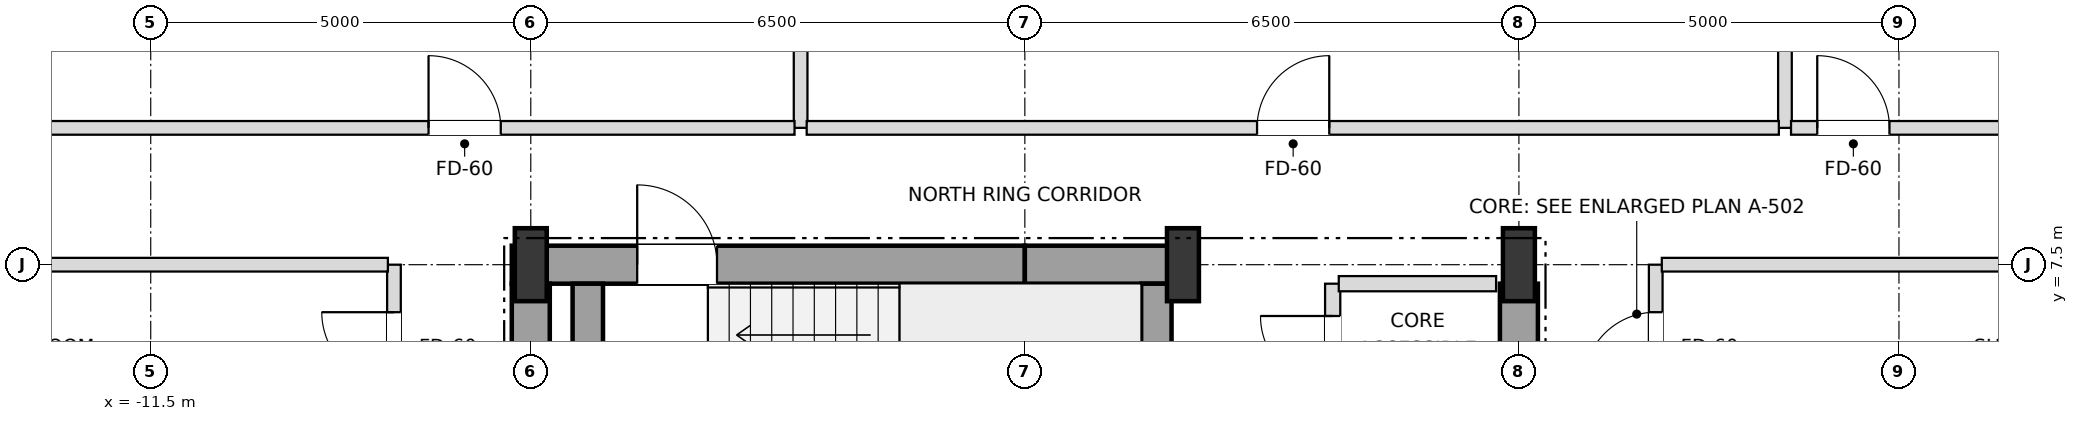
"""IFC4 building model, lengths in metres.
Left out: names, types, materials, properties, quantities, classifications, styles, units other than length and angle.
Written with IfcOpenShell. Run it as: python <this file> out.ifc"""

import sys

from ifc_helpers import new_model, si_unit, direction, frame, frame_2d, origin, origin_2d, place, context, subcontext, project, spatial, rectangle, i_section, extrude, element, fill, save


model = new_model("IFC4")
c1 = context("Model", 3, precision=1e-05, world=origin(), true_north=direction((0.0, 1.0)))
c2 = subcontext(c1, "Body", "Model", "MODEL_VIEW")
j1 = project(units=[si_unit("LENGTHUNIT", "METRE"), si_unit("PLANEANGLEUNIT", "RADIAN")], contexts=[c1])
p1 = place(None, origin())
s1 = spatial("IfcSite", under=j1, at=p1, CompositionType="ELEMENT")
p2 = place(p1, origin())
s2 = spatial("IfcBuilding", under=s1, at=p2, CompositionType="ELEMENT")
p3 = place(p2, frame((0.0, 0.0, 86.4)))
s3 = spatial("IfcBuildingStorey", under=s2, at=p3, CompositionType="ELEMENT", Elevation=86.4)
for number, where, z_axis, x_axis in (
    (1, (-6.5, 7.5, 0.0), (0.0, 0.0, 1.0), (1.0, 0.0, 0.0)),
    (2, (2.08, 7.5, 0.0), (0.0, 0.0, 1.0), (1.0, 0.0, 0.0)),
    (3, (6.5, 7.5, 0.0), (0.0, 0.0, 1.0), (1.0, 0.0, 0.0)),
):
    element("IfcColumn", number, at=place(p3, frame(where, z_axis=z_axis, x_axis=x_axis)), inside=s3, PredefinedType="COLUMN", context=c2, shape_type="SweptSolid", body=[
        extrude(i_section(OverallWidth=0.42, OverallDepth=0.96, WebThickness=0.022, FlangeThickness=0.034, at=origin_2d()), origin(), (0.0, 0.0, 1.0), 3.6),
    ])
p4 = place(p3, frame((-6.75, 7.5, 0.0), z_axis=(0.0, 0.0, 1.0), x_axis=(1.0, 0.0, 0.0)))
e4 = element("IfcWall", 4, at=p4, inside=s3, PredefinedType="SHEAR", context=c2, shape_type="SweptSolid", body=[
    extrude(rectangle(XDim=6.75, YDim=0.5, at=frame_2d((3.375, 0.0))), origin(), (0.0, 0.0, 1.0), 3.38),
])
p5 = place(p4, frame((1.65, 0.0, 0.0)))
e5 = element("IfcOpeningElement", 5, at=p5, cuts=e4, PredefinedType="OPENING", context=c2, shape_type="SweptSolid", body=[
    extrude(rectangle(XDim=1.05, YDim=2.15, at=frame_2d((0.525, 1.075))), frame((0.0, 0.26, 0.0), z_axis=(0.0, -1.0, 0.0), x_axis=(1.0, 0.0, 0.0)), (0.0, 0.0, 1.0), 0.52),
])
p6 = place(p3, frame((0.0, 7.5, 0.0), z_axis=(0.0, 0.0, 1.0), x_axis=(1.0, 0.0, 0.0)))
e6 = element("IfcWall", 6, at=p6, inside=s3, PredefinedType="SHEAR", context=c2, shape_type="SweptSolid", body=[
    extrude(rectangle(XDim=2.08, YDim=0.5, at=frame_2d((1.04, 0.0))), origin(), (0.0, 0.0, 1.0), 3.38),
])
for number, where, z_axis, x_axis in (
    (7, (-6.5, 3.95, 0.0), (0.0, 0.0, 1.0), (0.0, 1.0, 0.0)),
    (8, (6.5, 3.95, 0.0), (0.0, 0.0, 1.0), (0.0, 1.0, 0.0)),
):
    element("IfcWall", number, at=place(p3, frame(where, z_axis=z_axis, x_axis=x_axis)), inside=s3, PredefinedType="SHEAR", context=c2, shape_type="SweptSolid", body=[
        extrude(rectangle(XDim=3.3, YDim=0.5, at=frame_2d((1.65, 0.0))), origin(), (0.0, 0.0, 1.0), 3.38),
    ])
for number, where, z_axis, x_axis in (
    (9, (1.73, 3.95, 0.0), (0.0, 0.0, 1.0), (0.0, 1.0, 0.0)),
    (10, (-5.75, 3.95, 0.0), (0.0, 0.0, 1.0), (0.0, 1.0, 0.0)),
):
    element("IfcWall", number, at=place(p3, frame(where, z_axis=z_axis, x_axis=x_axis)), inside=s3, PredefinedType="SHEAR", context=c2, shape_type="SweptSolid", body=[
        extrude(rectangle(XDim=3.3, YDim=0.4, at=frame_2d((1.65, 0.0))), origin(), (0.0, 0.0, 1.0), 3.38),
    ])
p7 = place(p3, frame((-8.3, -7.5, 0.0), z_axis=(0.0, 0.0, 1.0), x_axis=(0.0, 1.0, 0.0)))
e11 = element("IfcWall", 11, at=p7, inside=s3, PredefinedType="PARTITIONING", context=c2, shape_type="SweptSolid", body=[
    extrude(rectangle(XDim=15.0, YDim=0.18, at=frame_2d((7.5, 0.0))), origin(), (0.0, 0.0, 1.0), 3.38),
])
p8 = place(p7, frame((2.075, 0.0, 0.0)))
e12 = element("IfcOpeningElement", 12, at=p8, cuts=e11, PredefinedType="OPENING", context=c2, shape_type="SweptSolid", body=[
    extrude(rectangle(XDim=0.95, YDim=2.15, at=frame_2d((0.475, 1.075))), frame((0.0, 0.1, 0.0), z_axis=(0.0, -1.0, 0.0), x_axis=(1.0, 0.0, 0.0)), (0.0, 0.0, 1.0), 0.2),
])
p9 = place(p7, frame((8.475, 0.0, 0.0)))
e13 = element("IfcOpeningElement", 13, at=p9, cuts=e11, PredefinedType="OPENING", context=c2, shape_type="SweptSolid", body=[
    extrude(rectangle(XDim=0.95, YDim=2.15, at=frame_2d((0.475, 1.075))), frame((0.0, 0.1, 0.0), z_axis=(0.0, -1.0, 0.0), x_axis=(1.0, 0.0, 0.0)), (0.0, 0.0, 1.0), 0.2),
])
p10 = place(p7, frame((13.425, 0.0, 0.0)))
e14 = element("IfcOpeningElement", 14, at=p10, cuts=e11, PredefinedType="OPENING", context=c2, shape_type="SweptSolid", body=[
    extrude(rectangle(XDim=0.95, YDim=2.15, at=frame_2d((0.475, 1.075))), frame((0.0, 0.1, 0.0), z_axis=(0.0, -1.0, 0.0), x_axis=(1.0, 0.0, 0.0)), (0.0, 0.0, 1.0), 0.2),
])
p11 = place(p3, frame((-2.95, 9.3, 0.0), z_axis=(0.0, 0.0, 1.0), x_axis=(0.0, 1.0, 0.0)))
e15 = element("IfcWall", 15, at=p11, inside=s3, PredefinedType="PARTITIONING", context=c2, shape_type="SweptSolid", body=[
    extrude(rectangle(XDim=15.6, YDim=0.18, at=frame_2d((7.8, 0.0))), origin(), (0.0, 0.0, 1.0), 2.816),
])
p12 = place(p3, frame((4.05, 5.55, 0.0), z_axis=(0.0, 0.0, 1.0), x_axis=(0.0, 1.0, 0.0)))
e16 = element("IfcWall", 16, at=p12, inside=s3, PredefinedType="SOLIDWALL", context=c2, shape_type="SweptSolid", body=[
    extrude(rectangle(XDim=1.7, YDim=0.2, at=frame_2d((0.85, 0.0))), origin(), (0.0, 0.0, 1.0), 3.38),
])
p13 = place(p12, frame((0.325, 0.0, 0.0)))
e17 = element("IfcOpeningElement", 17, at=p13, cuts=e16, PredefinedType="OPENING", context=c2, shape_type="SweptSolid", body=[
    extrude(rectangle(XDim=0.95, YDim=2.15, at=frame_2d((0.475, 1.075))), frame((0.0, 0.11, 0.0), z_axis=(0.0, -1.0, 0.0), x_axis=(1.0, 0.0, 0.0)), (0.0, 0.0, 1.0), 0.22),
])
p14 = place(p3, frame((8.3, -7.5, 0.0), z_axis=(0.0, 0.0, 1.0), x_axis=(0.0, 1.0, 0.0)))
e18 = element("IfcWall", 18, at=p14, inside=s3, PredefinedType="PARTITIONING", context=c2, shape_type="SweptSolid", body=[
    extrude(rectangle(XDim=15.0, YDim=0.18, at=frame_2d((7.5, 0.0))), origin(), (0.0, 0.0, 1.0), 3.38),
])
p15 = place(p14, frame((2.075, 0.0, 0.0)))
e19 = element("IfcOpeningElement", 19, at=p15, cuts=e18, PredefinedType="OPENING", context=c2, shape_type="SweptSolid", body=[
    extrude(rectangle(XDim=0.95, YDim=2.15, at=frame_2d((0.475, 1.075))), frame((0.0, 0.1, 0.0), z_axis=(0.0, -1.0, 0.0), x_axis=(1.0, 0.0, 0.0)), (0.0, 0.0, 1.0), 0.2),
])
p16 = place(p14, frame((8.475, 0.0, 0.0)))
e20 = element("IfcOpeningElement", 20, at=p16, cuts=e18, PredefinedType="OPENING", context=c2, shape_type="SweptSolid", body=[
    extrude(rectangle(XDim=0.95, YDim=2.15, at=frame_2d((0.475, 1.075))), frame((0.0, 0.1, 0.0), z_axis=(0.0, -1.0, 0.0), x_axis=(1.0, 0.0, 0.0)), (0.0, 0.0, 1.0), 0.2),
])
p17 = place(p14, frame((13.425, 0.0, 0.0)))
e21 = element("IfcOpeningElement", 21, at=p17, cuts=e18, PredefinedType="OPENING", context=c2, shape_type="SweptSolid", body=[
    extrude(rectangle(XDim=0.95, YDim=2.15, at=frame_2d((0.475, 1.075))), frame((0.0, 0.1, 0.0), z_axis=(0.0, -1.0, 0.0), x_axis=(1.0, 0.0, 0.0)), (0.0, 0.0, 1.0), 0.2),
])
p18 = place(p3, frame((10.0, 9.3, 0.0), z_axis=(0.0, 0.0, 1.0), x_axis=(0.0, 1.0, 0.0)))
e22 = element("IfcWall", 22, at=p18, inside=s3, PredefinedType="PARTITIONING", context=c2, shape_type="SweptSolid", body=[
    extrude(rectangle(XDim=15.6, YDim=0.18, at=frame_2d((7.8, 0.0))), origin(), (0.0, 0.0, 1.0), 2.816),
])
p19 = place(p3, frame((4.13, 7.25, 0.0), z_axis=(0.0, 0.0, 1.0), x_axis=(1.0, 0.0, 0.0)))
e23 = element("IfcWall", 23, at=p19, inside=s3, PredefinedType="SOLIDWALL", context=c2, shape_type="SweptSolid", body=[
    extrude(rectangle(XDim=2.07, YDim=0.2, at=frame_2d((1.035, 0.0))), origin(), (0.0, 0.0, 1.0), 3.38),
])
for number, where, z_axis, x_axis in (
    (24, (-21.9, 7.5, 0.0), (0.0, 0.0, 1.0), (1.0, 0.0, 0.0)),
    (25, (8.38, 7.5, 0.0), (0.0, 0.0, 1.0), (1.0, 0.0, 0.0)),
):
    element("IfcWall", number, at=place(p3, frame(where, z_axis=z_axis, x_axis=x_axis)), inside=s3, PredefinedType="PARTITIONING", context=c2, shape_type="SweptSolid", body=[
        extrude(rectangle(XDim=13.52, YDim=0.18, at=frame_2d((6.76, 0.0))), origin(), (0.0, 0.0, 1.0), 2.816),
    ])
p20 = place(p3, frame((-18.4, 9.3, 0.0), z_axis=(0.0, 0.0, 1.0), x_axis=(1.0, 0.0, 0.0)))
e26 = element("IfcWall", 26, at=p20, inside=s3, PredefinedType="PARTITIONING", context=c2, shape_type="SweptSolid", body=[
    extrude(rectangle(XDim=15.37, YDim=0.18, at=frame_2d((7.685, 0.0))), origin(), (0.0, 0.0, 1.0), 2.816),
])
p21 = place(p20, frame((10.555, 0.0, 0.0)))
e27 = element("IfcOpeningElement", 27, at=p21, cuts=e26, PredefinedType="OPENING", context=c2, shape_type="SweptSolid", body=[
    extrude(rectangle(XDim=0.95, YDim=2.15, at=frame_2d((0.475, 1.075))), frame((0.0, 0.1, 0.0), z_axis=(0.0, -1.0, 0.0), x_axis=(1.0, 0.0, 0.0)), (0.0, 0.0, 1.0), 0.2),
])
p22 = place(p3, frame((-2.87, 9.3, 0.0), z_axis=(0.0, 0.0, 1.0), x_axis=(1.0, 0.0, 0.0)))
e28 = element("IfcWall", 28, at=p22, inside=s3, PredefinedType="PARTITIONING", context=c2, shape_type="SweptSolid", body=[
    extrude(rectangle(XDim=12.79, YDim=0.18, at=frame_2d((6.395, 0.0))), origin(), (0.0, 0.0, 1.0), 2.816),
])
p23 = place(p22, frame((5.925, 0.0, 0.0)))
e29 = element("IfcOpeningElement", 29, at=p23, cuts=e28, PredefinedType="OPENING", context=c2, shape_type="SweptSolid", body=[
    extrude(rectangle(XDim=0.95, YDim=2.15, at=frame_2d((0.475, 1.075))), frame((0.0, 0.1, 0.0), z_axis=(0.0, -1.0, 0.0), x_axis=(1.0, 0.0, 0.0)), (0.0, 0.0, 1.0), 0.2),
])
p24 = place(p3, frame((10.08, 9.3, 0.0), z_axis=(0.0, 0.0, 1.0), x_axis=(1.0, 0.0, 0.0)))
e30 = element("IfcWall", 30, at=p24, inside=s3, PredefinedType="PARTITIONING", context=c2, shape_type="SweptSolid", body=[
    extrude(rectangle(XDim=8.32, YDim=0.18, at=frame_2d((4.16, 0.0))), origin(), (0.0, 0.0, 1.0), 2.816),
])
p25 = place(p24, frame((0.345, 0.0, 0.0)))
e31 = element("IfcOpeningElement", 31, at=p25, cuts=e30, PredefinedType="OPENING", context=c2, shape_type="SweptSolid", body=[
    extrude(rectangle(XDim=0.95, YDim=2.15, at=frame_2d((0.475, 1.075))), frame((0.0, 0.1, 0.0), z_axis=(0.0, -1.0, 0.0), x_axis=(1.0, 0.0, 0.0)), (0.0, 0.0, 1.0), 0.2),
])
p26 = place(p5, origin())
e32 = element("IfcDoor", 32, at=p26, inside=s3, OperationType="SINGLE_SWING_LEFT", PredefinedType="DOOR", context=c2, shape_type="SweptSolid", body=[
    extrude(rectangle(XDim=1.05, YDim=2.15, at=frame_2d((0.525, 1.075))), frame((0.0, 0.025, 0.0), z_axis=(0.0, -1.0, 0.0), x_axis=(1.0, 0.0, 0.0)), (0.0, 0.0, 1.0), 0.05),
])
fill(e5, e32)
p27 = place(p13, origin())
e33 = element("IfcDoor", 33, at=p27, inside=s3, OperationType="SINGLE_SWING_RIGHT", PredefinedType="DOOR", context=c2, shape_type="SweptSolid", body=[
    extrude(rectangle(XDim=0.95, YDim=2.15, at=frame_2d((0.475, 1.075))), frame((0.0, 0.025, 0.0), z_axis=(0.0, -1.0, 0.0), x_axis=(1.0, 0.0, 0.0)), (0.0, 0.0, 1.0), 0.05),
])
fill(e17, e33)
p28 = place(p21, origin())
e34 = element("IfcDoor", 34, at=p28, inside=s3, OperationType="SINGLE_SWING_LEFT", PredefinedType="DOOR", context=c2, shape_type="SweptSolid", body=[
    extrude(rectangle(XDim=0.95, YDim=2.15, at=frame_2d((0.475, 1.075))), frame((0.0, 0.025, 0.0), z_axis=(0.0, -1.0, 0.0), x_axis=(1.0, 0.0, 0.0)), (0.0, 0.0, 1.0), 0.05),
])
fill(e27, e34)
p29 = place(p23, origin())
e35 = element("IfcDoor", 35, at=p29, inside=s3, OperationType="SINGLE_SWING_RIGHT", PredefinedType="DOOR", context=c2, shape_type="SweptSolid", body=[
    extrude(rectangle(XDim=0.95, YDim=2.15, at=frame_2d((0.475, 1.075))), frame((0.0, 0.025, 0.0), z_axis=(0.0, -1.0, 0.0), x_axis=(1.0, 0.0, 0.0)), (0.0, 0.0, 1.0), 0.05),
])
fill(e29, e35)
p30 = place(p25, origin())
e36 = element("IfcDoor", 36, at=p30, inside=s3, OperationType="SINGLE_SWING_LEFT", PredefinedType="DOOR", context=c2, shape_type="SweptSolid", body=[
    extrude(rectangle(XDim=0.95, YDim=2.15, at=frame_2d((0.475, 1.075))), frame((0.0, 0.025, 0.0), z_axis=(0.0, -1.0, 0.0), x_axis=(1.0, 0.0, 0.0)), (0.0, 0.0, 1.0), 0.05),
])
fill(e31, e36)
p31 = place(p10, origin())
e37 = element("IfcDoor", 37, at=p31, inside=s3, OperationType="SINGLE_SWING_RIGHT", PredefinedType="DOOR", context=c2, shape_type="SweptSolid", body=[
    extrude(rectangle(XDim=0.95, YDim=2.15, at=frame_2d((0.475, 1.075))), frame((0.0, 0.025, 0.0), z_axis=(0.0, -1.0, 0.0), x_axis=(1.0, 0.0, 0.0)), (0.0, 0.0, 1.0), 0.05),
])
fill(e14, e37)
p32 = place(p17, origin())
e38 = element("IfcDoor", 38, at=p32, inside=s3, OperationType="SINGLE_SWING_LEFT", PredefinedType="DOOR", context=c2, shape_type="SweptSolid", body=[
    extrude(rectangle(XDim=0.95, YDim=2.15, at=frame_2d((0.475, 1.075))), frame((0.0, 0.025, 0.0), z_axis=(0.0, -1.0, 0.0), x_axis=(1.0, 0.0, 0.0)), (0.0, 0.0, 1.0), 0.05),
])
fill(e21, e38)
save(model, sys.argv[1])
